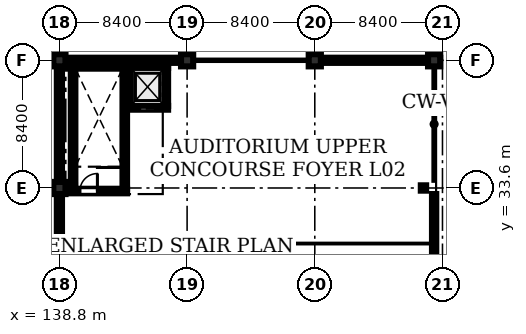
"""IFC4 building model, lengths in metres.
Left out: names, types, materials, properties, quantities, classifications, styles, units other than length and angle.
Written with IfcOpenShell. Run it as: python <this file> out.ifc"""

import sys

from ifc_helpers import new_model, si_unit, direction, frame, frame_2d, origin, origin_2d, place, context, subcontext, project, spatial, rectangle, i_section, extrude, element, fill, save


model = new_model("IFC4")
c1 = context("Model", 3, precision=1e-05, world=origin(), true_north=direction((0.0, 1.0)))
c2 = subcontext(c1, "Body", "Model", "MODEL_VIEW")
j1 = project(units=[si_unit("LENGTHUNIT", "METRE"), si_unit("PLANEANGLEUNIT", "RADIAN")], contexts=[c1])
p1 = place(None, origin())
s1 = spatial("IfcSite", under=j1, at=p1, CompositionType="ELEMENT")
p2 = place(p1, origin())
s2 = spatial("IfcBuilding", under=s1, at=p2, CompositionType="ELEMENT")
p3 = place(p2, frame((0.0, 0.0, 5.4)))
s3 = spatial("IfcBuildingStorey", under=s2, at=p3, CompositionType="ELEMENT", Elevation=5.4)
for number, where, z_axis, x_axis in (
    (1, (138.8, 33.6, 0.0), (0.0, 0.0, 1.0), (1.0, 0.0, 0.0)),
    (2, (138.8, 42.0, 0.0), (0.0, 0.0, 1.0), (1.0, 0.0, 0.0)),
    (3, (147.2, 42.0, 0.0), (0.0, 0.0, 1.0), (1.0, 0.0, 0.0)),
    (4, (155.6, 42.0, 0.0), (0.0, 0.0, 1.0), (1.0, 0.0, 0.0)),
    (5, (163.45, 42.0, 0.0), (0.0, 0.0, 1.0), (1.0, 0.0, 0.0)),
):
    element("IfcColumn", number, at=place(p3, frame(where, z_axis=z_axis, x_axis=x_axis)), inside=s3, PredefinedType="COLUMN", context=c2, shape_type="SweptSolid", body=[
        extrude(rectangle(XDim=0.8, YDim=0.8, at=origin_2d()), origin(), (0.0, 0.0, 1.0), 4.6),
    ])
p4 = place(p3, frame((139.2, 33.4, 0.0), z_axis=(0.0, 0.0, 1.0), x_axis=(1.0, 0.0, 0.0)))
e6 = element("IfcWall", 6, at=p4, inside=s3, PredefinedType="SHEAR", context=c2, shape_type="SweptSolid", body=[
    extrude(rectangle(XDim=4.05, YDim=0.3, at=frame_2d((2.025, 0.0))), origin(), (0.0, 0.0, 1.0), 4.6),
])
p5 = place(p4, frame((0.95, 0.0, 0.0)))
e7 = element("IfcOpeningElement", 7, at=p5, cuts=e6, PredefinedType="OPENING", context=c2, shape_type="SweptSolid", body=[
    extrude(rectangle(XDim=1.15, YDim=2.15, at=frame_2d((0.575, 1.075))), frame((0.0, 0.16, 0.0), z_axis=(0.0, -1.0, 0.0), x_axis=(1.0, 0.0, 0.0)), (0.0, 0.0, 1.0), 0.32),
])
p6 = place(p3, frame((139.2, 41.6, 0.0), z_axis=(0.0, 0.0, 1.0), x_axis=(1.0, 0.0, 0.0)))
e8 = element("IfcWall", 8, at=p6, inside=s3, PredefinedType="SHEAR", context=c2, shape_type="SweptSolid", body=[
    extrude(rectangle(XDim=4.05, YDim=0.3, at=frame_2d((2.025, 0.0))), origin(), (0.0, 0.0, 1.0), 4.6),
])
for number, where, z_axis, x_axis in (
    (9, (139.7, 33.55, 0.0), (0.0, 0.0, 1.0), (0.0, 1.0, 0.0)),
    (10, (143.1, 33.55, 0.0), (0.0, 0.0, 1.0), (0.0, 1.0, 0.0)),
):
    element("IfcWall", number, at=place(p3, frame(where, z_axis=z_axis, x_axis=x_axis)), inside=s3, PredefinedType="SHEAR", context=c2, shape_type="SweptSolid", body=[
        extrude(rectangle(XDim=7.9, YDim=0.3, at=frame_2d((3.95, 0.0))), origin(), (0.0, 0.0, 1.0), 4.6),
    ])
p7 = place(p3, frame((143.25, 38.875, 0.0), z_axis=(0.0, 0.0, 1.0), x_axis=(1.0, 0.0, 0.0)))
e11 = element("IfcWall", 11, at=p7, inside=s3, PredefinedType="SHEAR", context=c2, shape_type="SweptSolid", body=[
    extrude(rectangle(XDim=2.7, YDim=0.25, at=frame_2d((1.35, 0.0))), origin(), (0.0, 0.0, 1.0), 4.6),
])
p8 = place(p7, frame((0.835, 0.0, 0.0)))
e12 = element("IfcOpeningElement", 12, at=p8, cuts=e11, PredefinedType="OPENING", context=c2, shape_type="SweptSolid", body=[
    extrude(rectangle(XDim=1.03, YDim=2.15, at=frame_2d((0.515, 1.075))), frame((0.0, 0.135, 0.0), z_axis=(0.0, -1.0, 0.0), x_axis=(1.0, 0.0, 0.0)), (0.0, 0.0, 1.0), 0.27),
])
p9 = place(p3, frame((143.25, 41.625, 0.0), z_axis=(0.0, 0.0, 1.0), x_axis=(1.0, 0.0, 0.0)))
e13 = element("IfcWall", 13, at=p9, inside=s3, PredefinedType="SHEAR", context=c2, shape_type="SweptSolid", body=[
    extrude(rectangle(XDim=2.7, YDim=0.25, at=frame_2d((1.35, 0.0))), origin(), (0.0, 0.0, 1.0), 4.6),
])
for number, where, z_axis, x_axis in (
    (14, (143.375, 39.0, 0.0), (0.0, 0.0, 1.0), (0.0, 1.0, 0.0)),
    (15, (145.825, 39.0, 0.0), (0.0, 0.0, 1.0), (0.0, 1.0, 0.0)),
):
    element("IfcWall", number, at=place(p3, frame(where, z_axis=z_axis, x_axis=x_axis)), inside=s3, PredefinedType="SHEAR", context=c2, shape_type="SweptSolid", body=[
        extrude(rectangle(XDim=2.5, YDim=0.25, at=frame_2d((1.25, 0.0))), origin(), (0.0, 0.0, 1.0), 4.6),
    ])
for number, where, z_axis, x_axis in (
    (16, (139.65, 33.6, 0.0), (0.0, 0.0, 1.0), (1.0, 0.0, 0.0)),
    (17, (162.75, 33.6, 0.0), (0.0, 0.0, 1.0), (1.0, 0.0, 0.0)),
):
    element("IfcColumn", number, at=place(p3, frame(where, z_axis=z_axis, x_axis=x_axis)), inside=s3, PredefinedType="COLUMN", context=c2, shape_type="SweptSolid", body=[
        extrude(i_section(OverallWidth=0.35, OverallDepth=0.35, WebThickness=0.012, FlangeThickness=0.019, at=origin_2d()), origin(), (0.0, 0.0, 1.0), 2.7),
    ])
p10 = place(p3, frame((163.45, 33.2, 0.0), z_axis=(0.0, 0.0, 1.0), x_axis=(0.0, -1.0, 0.0)))
e18 = element("IfcWall", 18, at=p10, inside=s3, PredefinedType="STANDARD", context=c2, shape_type="SweptSolid", body=[
    extrude(rectangle(XDim=7.6, YDim=0.28, at=frame_2d((3.8, 0.0))), origin(), (0.0, 0.0, 1.0), 4.6),
])
p11 = place(p10, frame((2.8, 0.0, 2.2)))
e19 = element("IfcOpeningElement", 19, at=p11, cuts=e18, PredefinedType="OPENING", context=c2, shape_type="SweptSolid", body=[
    extrude(rectangle(XDim=1.6, YDim=1.2, at=frame_2d((0.8, 0.6))), frame((0.0, 0.15, 0.0), z_axis=(0.0, -1.0, 0.0), x_axis=(1.0, 0.0, 0.0)), (0.0, 0.0, 1.0), 0.3),
])
p12 = place(p3, frame((138.8, 25.6, 0.0), z_axis=(0.0, 0.0, 1.0), x_axis=(0.0, 1.0, 0.0)))
e20 = element("IfcWall", 20, at=p12, inside=s3, PredefinedType="STANDARD", context=c2, shape_type="SweptSolid", body=[
    extrude(rectangle(XDim=7.6, YDim=0.34, at=frame_2d((3.8, 0.0))), origin(), (0.0, 0.0, 1.0), 3.85),
])
p13 = place(p12, frame((0.85, 0.0, 1.6)))
e21 = element("IfcOpeningElement", 21, at=p13, cuts=e20, PredefinedType="OPENING", context=c2, shape_type="SweptSolid", body=[
    extrude(rectangle(XDim=1.4, YDim=1.4, at=frame_2d((0.7, 0.7))), frame((0.0, 0.18, 0.0), z_axis=(0.0, -1.0, 0.0), x_axis=(1.0, 0.0, 0.0)), (0.0, 0.0, 1.0), 0.36),
])
for number, where, z_axis, x_axis in (
    (22, (138.8, 34.0, 0.0), (0.0, 0.0, 1.0), (0.0, 1.0, 0.0)),
    (23, (139.2, 42.0, 0.0), (0.0, 0.0, 1.0), (1.0, 0.0, 0.0)),
):
    element("IfcWall", number, at=place(p3, frame(where, z_axis=z_axis, x_axis=x_axis)), inside=s3, PredefinedType="STANDARD", context=c2, shape_type="SweptSolid", body=[
        extrude(rectangle(XDim=7.6, YDim=0.34, at=frame_2d((3.8, 0.0))), origin(), (0.0, 0.0, 1.0), 3.85),
    ])
p14 = place(p3, frame((156.0, 42.0, 0.0), z_axis=(0.0, 0.0, 1.0), x_axis=(1.0, 0.0, 0.0)))
e24 = element("IfcWall", 24, at=p14, inside=s3, PredefinedType="STANDARD", context=c2, shape_type="SweptSolid", body=[
    extrude(rectangle(XDim=7.05, YDim=0.34, at=frame_2d((3.525, 0.0))), origin(), (0.0, 0.0, 1.0), 3.85),
])
p15 = place(p11, origin())
e25 = element("IfcWindow", 25, at=p15, inside=s3, PartitioningType="DOUBLE_PANEL_HORIZONTAL", PredefinedType="WINDOW", context=c2, shape_type="SweptSolid", body=[
    extrude(rectangle(XDim=1.6, YDim=1.2, at=frame_2d((0.8, 0.6))), frame((0.0, 0.03, 0.0), z_axis=(0.0, -1.0, 0.0), x_axis=(1.0, 0.0, 0.0)), (0.0, 0.0, 1.0), 0.06),
])
fill(e19, e25)
p16 = place(p5, origin())
e26 = element("IfcDoor", 26, at=p16, inside=s3, OperationType="SINGLE_SWING_RIGHT", PredefinedType="DOOR", context=c2, shape_type="SweptSolid", body=[
    extrude(rectangle(XDim=1.15, YDim=2.15, at=frame_2d((0.575, 1.075))), frame((0.0, 0.025, 0.0), z_axis=(0.0, -1.0, 0.0), x_axis=(1.0, 0.0, 0.0)), (0.0, 0.0, 1.0), 0.05),
])
fill(e7, e26)
p17 = place(p8, origin())
e27 = element("IfcDoor", 27, at=p17, inside=s3, OperationType="SLIDING_TO_LEFT", PredefinedType="DOOR", context=c2, shape_type="SweptSolid", body=[
    extrude(rectangle(XDim=1.03, YDim=2.15, at=frame_2d((0.515, 1.075))), frame((0.0, 0.025, 0.0), z_axis=(0.0, -1.0, 0.0), x_axis=(1.0, 0.0, 0.0)), (0.0, 0.0, 1.0), 0.05),
])
fill(e12, e27)
save(model, sys.argv[1])
